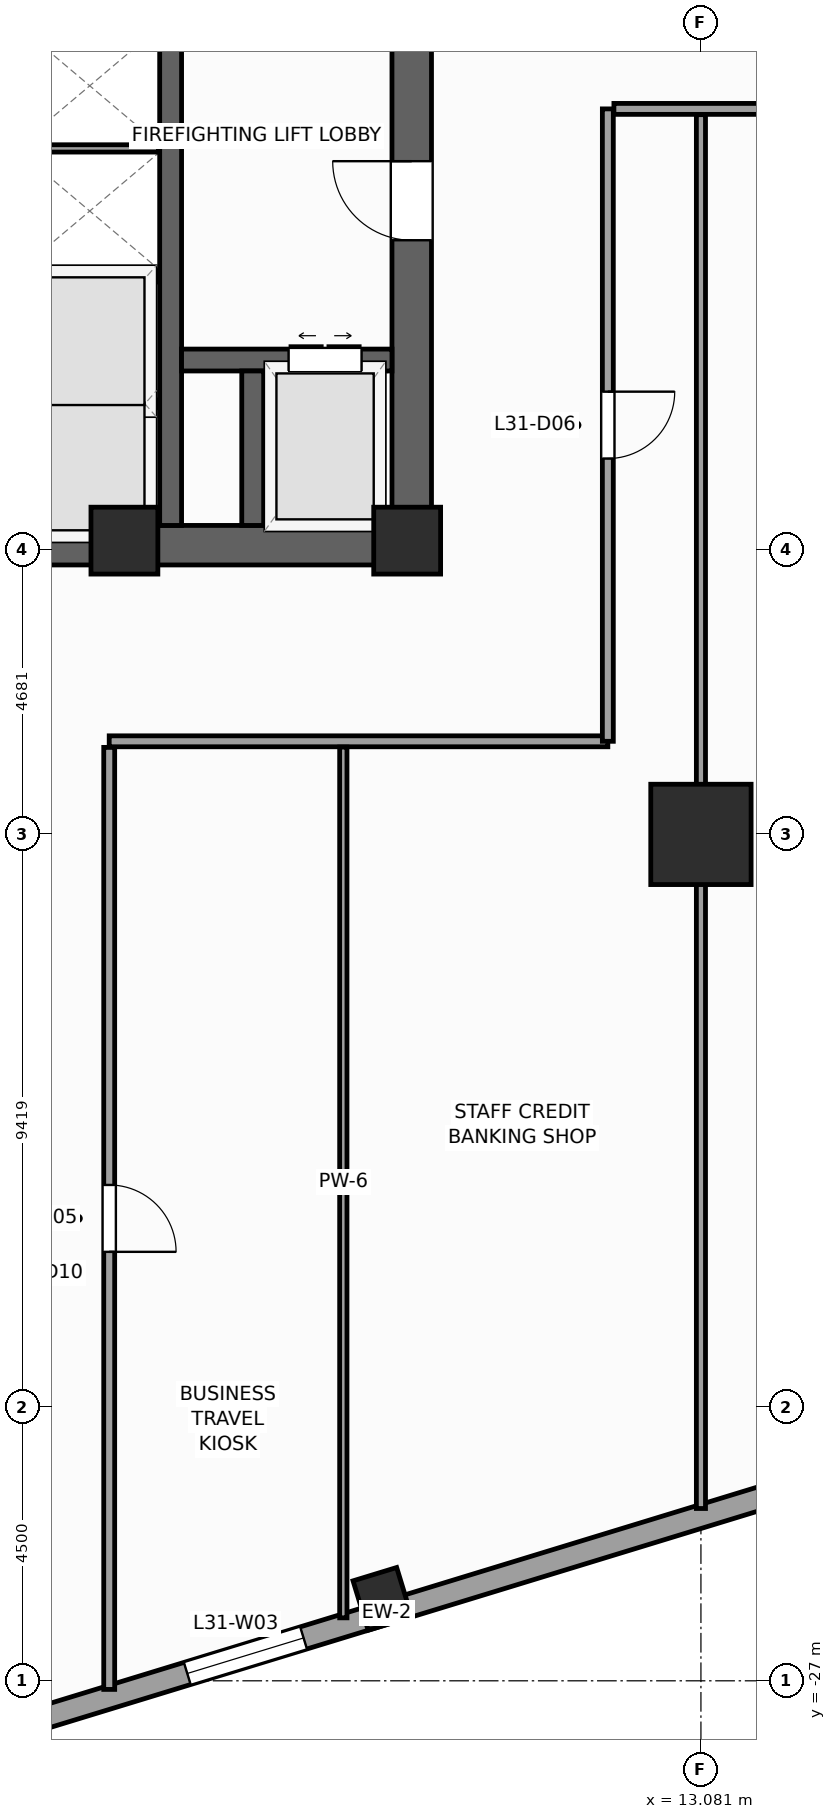
"""IFC4 building model, lengths in metres.
Left out: names, types, materials, properties, quantities, classifications, styles, units other than length and angle.
Written with IfcOpenShell. Run it as: python <this file> out.ifc"""

import sys

from ifc_helpers import new_model, si_unit, direction, frame, frame_2d, origin, origin_2d, place, context, subcontext, project, spatial, rectangle, extrude, source, transform, mapped, element, fill, save


model = new_model("IFC4")
c1 = context("Model", 3, precision=1e-05, world=origin(), true_north=direction((0.0, 1.0)))
c2 = subcontext(c1, "Body", "Model", "MODEL_VIEW")
j1 = project(units=[si_unit("LENGTHUNIT", "METRE"), si_unit("PLANEANGLEUNIT", "RADIAN")], contexts=[c1])
p1 = place(None, origin())
s1 = spatial("IfcSite", under=j1, at=p1, CompositionType="ELEMENT")
p2 = place(p1, origin())
s2 = spatial("IfcBuilding", under=s1, at=p2, CompositionType="ELEMENT")
p3 = place(p2, frame((0.0, 0.0, 131.2)))
s3 = spatial("IfcBuildingStorey", under=s2, at=p3, CompositionType="ELEMENT", Elevation=131.2)
p4 = place(p3, frame((-8.65, -8.325, 0.0), z_axis=(0.0, 0.0, 1.0), x_axis=(1.0, 0.0, 0.0)))
e1 = element("IfcWall", 1, at=p4, inside=s3, PredefinedType="SHEAR", context=c2, shape_type="SweptSolid", body=[
    extrude(rectangle(XDim=17.3, YDim=0.65, at=frame_2d((8.65, 0.0))), origin(), (0.0, 0.0, 1.0), 4.0),
])
p5 = place(p4, frame((8.0, 0.0, 0.0)))
e2 = element("IfcOpeningElement", 2, at=p5, cuts=e1, PredefinedType="OPENING", context=c2, shape_type="SweptSolid", body=[
    extrude(rectangle(XDim=1.3, YDim=2.2, at=frame_2d((0.65, 1.1))), frame((0.0, 0.335, 0.0), z_axis=(0.0, -1.0, 0.0), x_axis=(1.0, 0.0, 0.0)), (0.0, 0.0, 1.0), 0.67),
])
p6 = place(p3, frame((8.325, -8.0, 0.0), z_axis=(0.0, 0.0, 1.0), x_axis=(0.0, 1.0, 0.0)))
e3 = element("IfcWall", 3, at=p6, inside=s3, PredefinedType="SHEAR", context=c2, shape_type="SweptSolid", body=[
    extrude(rectangle(XDim=16.0, YDim=0.65, at=frame_2d((8.0, 0.0))), origin(), (0.0, 0.0, 1.0), 4.0),
])
p7 = place(p6, frame((4.69, 0.0, 0.0)))
e4 = element("IfcOpeningElement", 4, at=p7, cuts=e3, PredefinedType="OPENING", context=c2, shape_type="SweptSolid", body=[
    extrude(rectangle(XDim=1.3, YDim=2.2, at=frame_2d((0.65, 1.1))), frame((0.0, 0.335, 0.0), z_axis=(0.0, -1.0, 0.0), x_axis=(1.0, 0.0, 0.0)), (0.0, 0.0, 1.0), 0.67),
])
p8 = place(p3, frame((4.36, -8.0, 0.0), z_axis=(0.0, 0.0, 1.0), x_axis=(0.0, 1.0, 0.0)))
e5 = element("IfcWall", 5, at=p8, inside=s3, PredefinedType="SHEAR", context=c2, shape_type="SweptSolid", body=[
    extrude(rectangle(XDim=16.0, YDim=0.36, at=frame_2d((8.0, 0.0))), origin(), (0.0, 0.0, 1.0), 4.0),
])
p9 = place(p3, frame((4.54, -5.28, 0.0), z_axis=(0.0, 0.0, 1.0), x_axis=(1.0, 0.0, 0.0)))
e6 = element("IfcWall", 6, at=p9, inside=s3, PredefinedType="SHEAR", context=c2, shape_type="SweptSolid", body=[
    extrude(rectangle(XDim=3.46, YDim=0.36, at=frame_2d((1.73, 0.0))), origin(), (0.0, 0.0, 1.0), 4.0),
])
p10 = place(p9, frame((1.76, 0.0, 0.0)))
e7 = element("IfcOpeningElement", 7, at=p10, cuts=e6, PredefinedType="OPENING", context=c2, shape_type="SweptSolid", body=[
    extrude(rectangle(XDim=1.2, YDim=2.25, at=frame_2d((0.6, 1.125))), frame((0.0, 0.19, 0.0), z_axis=(0.0, -1.0, 0.0), x_axis=(1.0, 0.0, 0.0)), (0.0, 0.0, 1.0), 0.38),
])
p11 = place(p3, frame((5.71, -8.0, 0.0), z_axis=(0.0, 0.0, 1.0), x_axis=(0.0, 1.0, 0.0)))
e8 = element("IfcWall", 8, at=p11, inside=s3, PredefinedType="SHEAR", context=c2, shape_type="SweptSolid", body=[
    extrude(rectangle(XDim=2.54, YDim=0.36, at=frame_2d((1.27, 0.0))), origin(), (0.0, 0.0, 1.0), 4.0),
])
m1 = source(origin(), c2, "Body", "SweptSolid", [
    extrude(rectangle(XDim=1.1, YDim=1.1, at=origin_2d()), origin(), (0.0, 0.0, 1.0), 4.0),
])
for number, where, z_axis, x_axis in (
    (9, (8.25, -8.25, 0.0), (0.0, 0.0, 1.0), (1.0, 0.0, 0.0)),
    (10, (3.6, -8.25, 0.0), (0.0, 0.0, 1.0), (1.0, 0.0, 0.0)),
):
    element("IfcColumn", number, at=place(p3, frame(where, z_axis=z_axis, x_axis=x_axis)), inside=s3, PredefinedType="PILASTER", context=c2, shape_type="MappedRepresentation", body=[
        mapped(m1, transform((0.0, 0.0, 0.0), scale=1.0)),
    ])
m2 = source(origin(), c2, "Body", "SweptSolid", [
    extrude(rectangle(XDim=1.65, YDim=1.65, at=origin_2d()), origin(), (0.0, 0.0, 1.0), 4.0),
])
p12 = place(p3, frame((13.081, -13.081, 0.0), z_axis=(0.0, 0.0, 1.0), x_axis=(1.0, 0.0, 0.0)))
e11 = element("IfcColumn", 11, at=p12, inside=s3, PredefinedType="COLUMN", context=c2, shape_type="MappedRepresentation", body=[
    mapped(m2, transform((0.0, 0.0, 0.0), scale=1.0)),
])
m3 = source(origin(), c2, "Body", "SweptSolid", [
    extrude(rectangle(XDim=0.75, YDim=0.85, at=origin_2d()), origin(), (0.0, 0.0, 1.0), 4.0),
])
p13 = place(p3, frame((7.843, -25.653, 0.0), z_axis=(0.0, 0.0, 1.0), x_axis=(0.956304755963, 0.292371704723, 0.0)))
e12 = element("IfcColumn", 12, at=p13, inside=s3, PredefinedType="COLUMN", context=c2, shape_type="MappedRepresentation", body=[
    mapped(m3, transform((0.0, 0.0, 0.0), scale=1.0)),
])
p14 = place(p3, frame((-14.265, -32.658, 0.0), z_axis=(0.0, 0.0, 1.0), x_axis=(0.956304320851, 0.292373127906, 0.0)))
e13 = element("IfcWall", 13, at=p14, inside=s3, PredefinedType="STANDARD", context=c2, shape_type="SweptSolid", body=[
    extrude(rectangle(XDim=46.38, YDim=0.38, at=frame_2d((23.19, 0.0))), origin(), (0.0, 0.0, 1.0), 3.14),
])
p15 = place(p14, frame((4.865, 0.0, 0.51)))
e14 = element("IfcOpeningElement", 14, at=p15, cuts=e13, PredefinedType="OPENING", context=c2, shape_type="SweptSolid", body=[
    extrude(rectangle(XDim=1.4, YDim=2.4, at=frame_2d((0.7, 1.2))), frame((0.0, 0.2, 0.0), z_axis=(0.0, -1.0, 0.0), x_axis=(1.0, 0.0, 0.0)), (0.0, 0.0, 1.0), 0.4),
])
p16 = place(p14, frame((12.45, 0.0, 0.51)))
e15 = element("IfcOpeningElement", 15, at=p16, cuts=e13, PredefinedType="OPENING", context=c2, shape_type="SweptSolid", body=[
    extrude(rectangle(XDim=2.0, YDim=2.4, at=frame_2d((1.0, 1.2))), frame((0.0, 0.2, 0.0), z_axis=(0.0, -1.0, 0.0), x_axis=(1.0, 0.0, 0.0)), (0.0, 0.0, 1.0), 0.4),
])
p17 = place(p14, frame((19.762, 0.0, 0.51)))
e16 = element("IfcOpeningElement", 16, at=p17, cuts=e13, PredefinedType="OPENING", context=c2, shape_type="SweptSolid", body=[
    extrude(rectangle(XDim=2.0, YDim=2.4, at=frame_2d((1.0, 1.2))), frame((0.0, 0.2, 0.0), z_axis=(0.0, -1.0, 0.0), x_axis=(1.0, 0.0, 0.0)), (0.0, 0.0, 1.0), 0.4),
])
p18 = place(p14, frame((30.538, 0.0, 0.51)))
e17 = element("IfcOpeningElement", 17, at=p18, cuts=e13, PredefinedType="OPENING", context=c2, shape_type="SweptSolid", body=[
    extrude(rectangle(XDim=2.0, YDim=2.4, at=frame_2d((1.0, 1.2))), frame((0.0, 0.2, 0.0), z_axis=(0.0, -1.0, 0.0), x_axis=(1.0, 0.0, 0.0)), (0.0, 0.0, 1.0), 0.4),
])
p19 = place(p14, frame((39.187, 0.0, 0.51)))
e18 = element("IfcOpeningElement", 18, at=p19, cuts=e13, PredefinedType="OPENING", context=c2, shape_type="SweptSolid", body=[
    extrude(rectangle(XDim=1.4, YDim=2.4, at=frame_2d((0.7, 1.2))), frame((0.0, 0.2, 0.0), z_axis=(0.0, -1.0, 0.0), x_axis=(1.0, 0.0, 0.0)), (0.0, 0.0, 1.0), 0.4),
])
p20 = place(p3, frame((1.89, -3.9, 0.0), z_axis=(0.0, 0.0, 1.0), x_axis=(1.0, 0.0, 0.0)))
e19 = element("IfcWall", 19, at=p20, inside=s3, PredefinedType="PARTITIONING", context=c2, shape_type="SweptSolid", body=[
    extrude(rectangle(XDim=2.28, YDim=0.18, at=frame_2d((1.14, 0.0))), origin(), (0.0, 0.0, 1.0), 3.74),
])
for number, where, z_axis, x_axis in (
    (20, (1.9, -6.0, 0.0), (0.0, 0.0, 1.0), (1.0, 0.0, 0.0)),
    (21, (1.9, -1.8, 0.0), (0.0, 0.0, 1.0), (1.0, 0.0, 0.0)),
):
    element("IfcWall", number, at=place(p3, frame(where, z_axis=z_axis, x_axis=x_axis)), inside=s3, PredefinedType="PARTITIONING", context=c2, shape_type="SweptSolid", body=[
        extrude(rectangle(XDim=2.26, YDim=0.12, at=frame_2d((1.13, 0.0))), origin(), (0.0, 0.0, 1.0), 3.74),
    ])
p21 = place(p3, frame((3.35, -11.55, 0.0), z_axis=(0.0, 0.0, 1.0), x_axis=(1.0, 0.0, 0.0)))
e22 = element("IfcWall", 22, at=p21, inside=s3, PredefinedType="PARTITIONING", context=c2, shape_type="SweptSolid", body=[
    extrude(rectangle(XDim=8.2, YDim=0.18, at=frame_2d((4.1, 0.0))), origin(), (0.0, 0.0, 1.0), 3.74),
])
p22 = place(p3, frame((11.55, -11.55, 0.0), z_axis=(0.0, 0.0, 1.0), x_axis=(0.0, 1.0, 0.0)))
e23 = element("IfcWall", 23, at=p22, inside=s3, PredefinedType="PARTITIONING", context=c2, shape_type="SweptSolid", body=[
    extrude(rectangle(XDim=10.4, YDim=0.18, at=frame_2d((5.2, 0.0))), origin(), (0.0, 0.0, 1.0), 3.74),
])
p23 = place(p22, frame((4.65, 0.0, 0.0)))
e24 = element("IfcOpeningElement", 24, at=p23, cuts=e23, PredefinedType="OPENING", context=c2, shape_type="SweptSolid", body=[
    extrude(rectangle(XDim=1.1, YDim=2.2, at=frame_2d((0.55, 1.1))), frame((0.0, 0.1, 0.0), z_axis=(0.0, -1.0, 0.0), x_axis=(1.0, 0.0, 0.0)), (0.0, 0.0, 1.0), 0.2),
])
p24 = place(p3, frame((11.65, -1.15, 0.0), z_axis=(0.0, 0.0, 1.0), x_axis=(1.0, 0.0, 0.0)))
e25 = element("IfcWall", 25, at=p24, inside=s3, PredefinedType="PARTITIONING", context=c2, shape_type="SweptSolid", body=[
    extrude(rectangle(XDim=16.867, YDim=0.18, at=frame_2d((8.434, 0.0))), origin(), (0.0, 0.0, 1.0), 3.74),
])
p25 = place(p24, frame((8.435, 0.0, 0.0)))
e26 = element("IfcOpeningElement", 26, at=p25, cuts=e25, PredefinedType="OPENING", context=c2, shape_type="SweptSolid", body=[
    extrude(rectangle(XDim=1.1, YDim=2.2, at=frame_2d((0.55, 1.1))), frame((0.0, 0.1, 0.0), z_axis=(0.0, -1.0, 0.0), x_axis=(1.0, 0.0, 0.0)), (0.0, 0.0, 1.0), 0.2),
])
p26 = place(p3, frame((3.35, -27.142, 0.0), z_axis=(0.0, 0.0, 1.0), x_axis=(0.0, 1.0, 0.0)))
e27 = element("IfcWall", 27, at=p26, inside=s3, PredefinedType="PARTITIONING", context=c2, shape_type="SweptSolid", body=[
    extrude(rectangle(XDim=15.492, YDim=0.18, at=frame_2d((7.746, 0.0))), origin(), (0.0, 0.0, 1.0), 3.74),
])
p27 = place(p26, frame((7.196, 0.0, 0.0)))
e28 = element("IfcOpeningElement", 28, at=p27, cuts=e27, PredefinedType="OPENING", context=c2, shape_type="SweptSolid", body=[
    extrude(rectangle(XDim=1.1, YDim=2.2, at=frame_2d((0.55, 1.1))), frame((0.0, 0.1, 0.0), z_axis=(0.0, -1.0, 0.0), x_axis=(1.0, 0.0, 0.0)), (0.0, 0.0, 1.0), 0.2),
])
p28 = place(p3, frame((7.2, -25.964, 0.0), z_axis=(0.0, 0.0, 1.0), x_axis=(0.0, 1.0, 0.0)))
e29 = element("IfcWall", 29, at=p28, inside=s3, PredefinedType="PARTITIONING", context=c2, shape_type="SweptSolid", body=[
    extrude(rectangle(XDim=14.319, YDim=0.12, at=frame_2d((7.16, 0.0))), origin(), (0.0, 0.0, 1.0), 3.41),
])
p29 = place(p3, frame((13.081, -24.167, 0.0), z_axis=(0.0, 0.0, 1.0), x_axis=(0.0, 1.0, 0.0)))
e30 = element("IfcWall", 30, at=p29, inside=s3, PredefinedType="PARTITIONING", context=c2, shape_type="SweptSolid", body=[
    extrude(rectangle(XDim=22.921, YDim=0.15, at=frame_2d((11.461, 0.0))), origin(), (0.0, 0.0, 1.0), 2.732),
])
m4 = source(origin(), c2, "Body", "SweptSolid", [
    extrude(rectangle(XDim=2.0, YDim=2.4, at=frame_2d((1.0, 1.2))), frame((0.0, 0.03, 0.0), z_axis=(0.0, -1.0, 0.0), x_axis=(1.0, 0.0, 0.0)), (0.0, 0.0, 1.0), 0.06),
])
p30 = place(p17, origin())
e31 = element("IfcWindow", 31, at=p30, inside=s3, PartitioningType="SINGLE_PANEL", PredefinedType="WINDOW", context=c2, shape_type="MappedRepresentation", body=[
    mapped(m4, transform((0.0, 0.0, 0.0), scale=1.0)),
])
fill(e16, e31)
m5 = source(origin(), c2, "Body", "SweptSolid", [
    extrude(rectangle(XDim=1.3, YDim=2.2, at=frame_2d((0.65, 1.1))), frame((0.0, 0.025, 0.0), z_axis=(0.0, -1.0, 0.0), x_axis=(1.0, 0.0, 0.0)), (0.0, 0.0, 1.0), 0.05),
])
p31 = place(p7, origin())
e32 = element("IfcDoor", 32, at=p31, inside=s3, OperationType="SINGLE_SWING_RIGHT", PredefinedType="DOOR", context=c2, shape_type="MappedRepresentation", body=[
    mapped(m5, transform((0.0, 0.0, 0.0), scale=1.0)),
])
fill(e4, e32)
m6 = source(origin(), c2, "Body", "SweptSolid", [
    extrude(rectangle(XDim=1.2, YDim=2.25, at=frame_2d((0.6, 1.125))), frame((0.0, 0.025, 0.0), z_axis=(0.0, -1.0, 0.0), x_axis=(1.0, 0.0, 0.0)), (0.0, 0.0, 1.0), 0.05),
])
p32 = place(p10, origin())
e33 = element("IfcDoor", 33, at=p32, inside=s3, OperationType="DOUBLE_DOOR_SLIDING", PredefinedType="DOOR", context=c2, shape_type="MappedRepresentation", body=[
    mapped(m6, transform((0.0, 0.0, 0.0), scale=1.0)),
])
fill(e7, e33)
m7 = source(origin(), c2, "Body", "SweptSolid", [
    extrude(rectangle(XDim=1.1, YDim=2.2, at=frame_2d((0.55, 1.1))), frame((0.0, 0.025, 0.0), z_axis=(0.0, -1.0, 0.0), x_axis=(1.0, 0.0, 0.0)), (0.0, 0.0, 1.0), 0.05),
])
p33 = place(p27, frame((1.1, 0.0, 0.0), z_axis=(0.0, 0.0, 1.0), x_axis=(-1.0, 0.0, 0.0)))
e34 = element("IfcDoor", 34, at=p33, inside=s3, OperationType="SINGLE_SWING_LEFT", PredefinedType="DOOR", context=c2, shape_type="MappedRepresentation", body=[
    mapped(m7, transform((0.0, 0.0, 0.0), scale=1.0)),
])
fill(e28, e34)
p34 = place(p23, frame((1.1, 0.0, 0.0), z_axis=(0.0, 0.0, 1.0), x_axis=(-1.0, 0.0, 0.0)))
e35 = element("IfcDoor", 35, at=p34, inside=s3, OperationType="SINGLE_SWING_RIGHT", PredefinedType="DOOR", context=c2, shape_type="MappedRepresentation", body=[
    mapped(m7, transform((0.0, 0.0, 0.0), scale=1.0)),
])
fill(e24, e35)
save(model, sys.argv[1])
